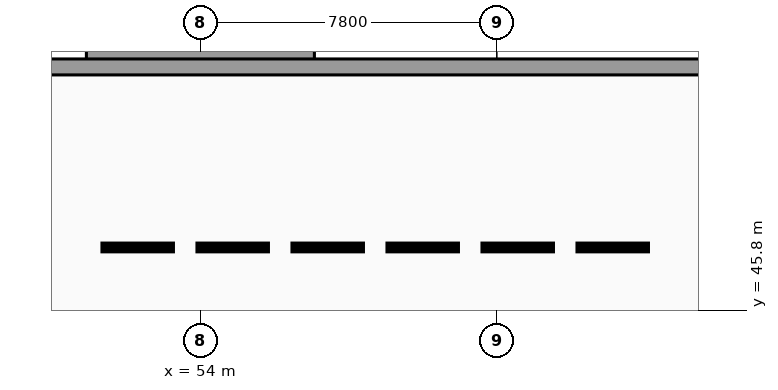
"""IFC4 building model, lengths in metres.
Left out: names, types, materials, properties, quantities, classifications, styles, units other than length and angle.
Written with IfcOpenShell. Run it as: python <this file> out.ifc"""

import sys

from ifc_helpers import new_model, si_unit, direction, frame, frame_2d, origin, place, context, subcontext, project, spatial, rectangle, extrude, element, save


model = new_model("IFC4")
c1 = context("Model", 3, precision=1e-05, world=origin(), true_north=direction((0.0, 1.0)))
c2 = subcontext(c1, "Body", "Model", "MODEL_VIEW")
j1 = project(units=[si_unit("LENGTHUNIT", "METRE"), si_unit("PLANEANGLEUNIT", "RADIAN")], contexts=[c1])
p1 = place(None, origin())
s1 = spatial("IfcSite", under=j1, at=p1, CompositionType="ELEMENT")
p2 = place(p1, origin())
s2 = spatial("IfcBuilding", under=s1, at=p2, CompositionType="ELEMENT")
p3 = place(p2, frame((0.0, 0.0, -4.08)))
s3 = spatial("IfcBuildingStorey", under=s2, at=p3, CompositionType="ELEMENT", Elevation=-4.08)
p4 = place(p3, frame((51.0, 52.55, 0.0), z_axis=(0.0, 0.0, 1.0), x_axis=(1.0, 0.0, 0.0)))
e1 = element("IfcWall", 1, at=p4, inside=s3, PredefinedType="SOLIDWALL", context=c2, shape_type="SweptSolid", body=[
    extrude(rectangle(XDim=6.0, YDim=0.42, at=frame_2d((3.0, 0.0))), origin(), (0.0, 0.0, 1.0), 3.88),
])
p5 = place(p3, frame((1.7, 52.2, 0.0), z_axis=(0.0, 0.0, 1.0), x_axis=(1.0, 0.0, 0.0)))
e2 = element("IfcWall", 2, at=p5, inside=s3, PredefinedType="SOLIDWALL", context=c2, shape_type="SweptSolid", body=[
    extrude(rectangle(XDim=73.4, YDim=0.42, at=frame_2d((36.7, 0.0))), origin(), (0.0, 0.0, 1.0), 3.76),
])
save(model, sys.argv[1])
